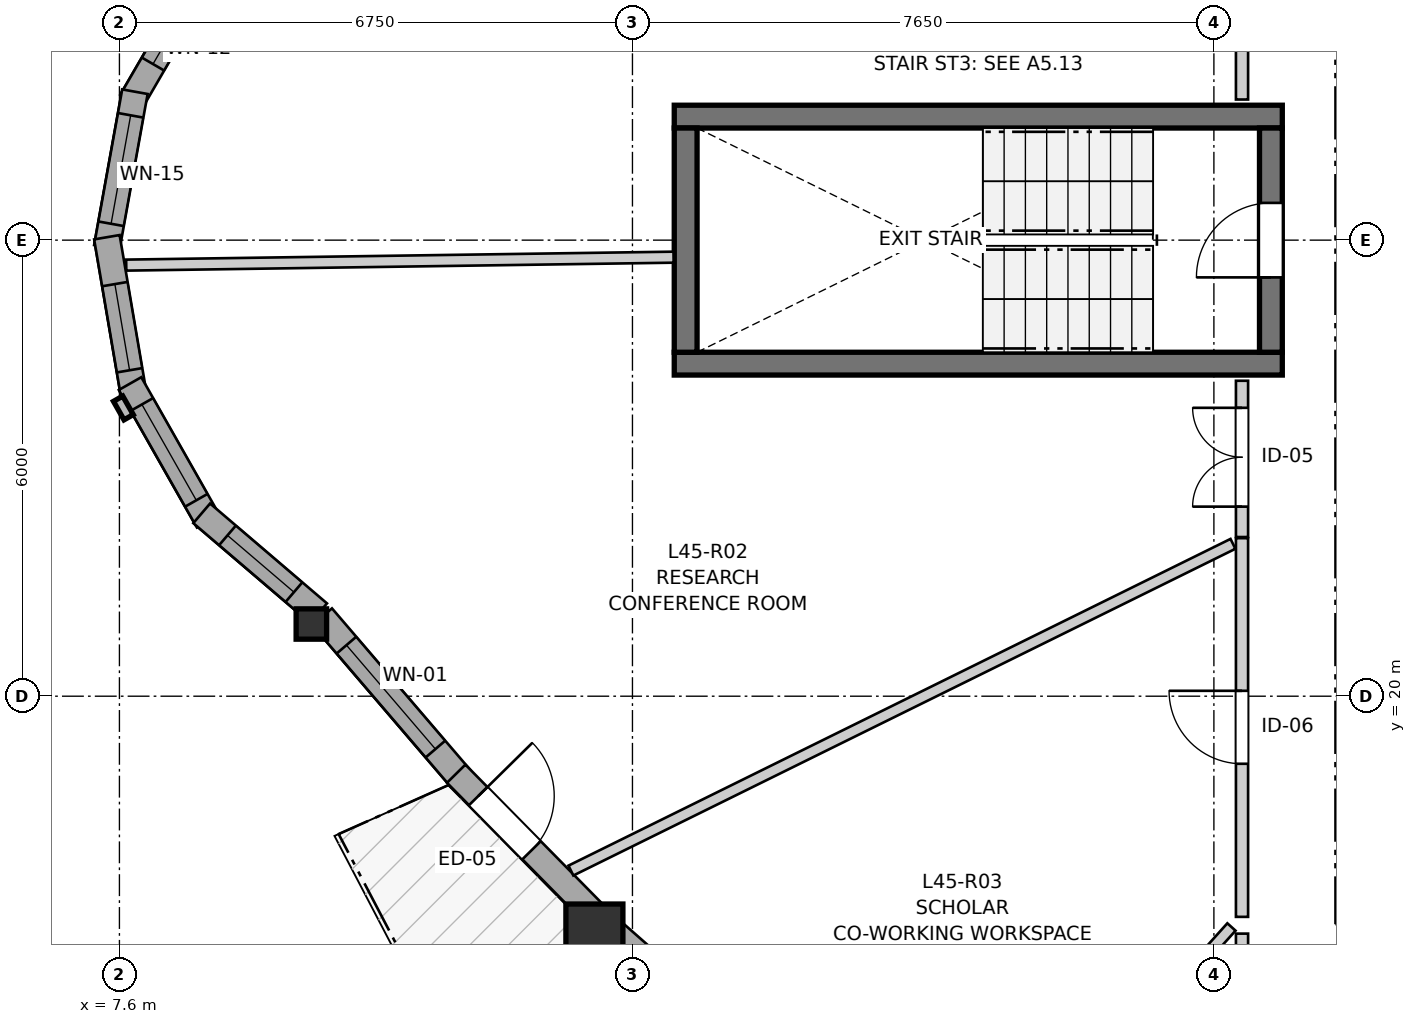
"""IFC4 building model, lengths in metres.
Left out: names, types, materials, properties, quantities, classifications, styles, units other than length and angle.
Written with IfcOpenShell. Run it as: python <this file> out.ifc"""

import sys

from ifc_helpers import new_model, si_unit, direction, frame, frame_2d, origin, origin_2d, place, context, subcontext, project, spatial, rectangle, i_section, extrude, source, transform, mapped, element, fill, save


model = new_model("IFC4")
c1 = context("Model", 3, precision=1e-05, world=origin(), true_north=direction((0.0, 1.0)))
c2 = subcontext(c1, "Body", "Model", "MODEL_VIEW")
j1 = project(units=[si_unit("LENGTHUNIT", "METRE"), si_unit("PLANEANGLEUNIT", "RADIAN")], contexts=[c1])
p1 = place(None, origin())
s1 = spatial("IfcSite", under=j1, at=p1, CompositionType="ELEMENT")
p2 = place(p1, origin())
s2 = spatial("IfcBuilding", under=s1, at=p2, CompositionType="ELEMENT")
p3 = place(p2, frame((0.0, 0.0, 152.2)))
s3 = spatial("IfcBuildingStorey", under=s2, at=p3, CompositionType="ELEMENT", Elevation=152.2)
for number, where, z_axis, x_axis in (
    (1, (14.9, 24.375, 0.0), (0.0, 0.0, 1.0), (1.0, 0.0, 0.0)),
    (2, (22.9, 27.625, 0.0), (0.0, 0.0, 1.0), (-1.0, 0.0, 0.0)),
):
    element("IfcWall", number, at=place(p3, frame(where, z_axis=z_axis, x_axis=x_axis)), inside=s3, PredefinedType="SHEAR", context=c2, shape_type="SweptSolid", body=[
        extrude(rectangle(XDim=8.0, YDim=0.3, at=frame_2d((4.0, 0.0))), origin(), (0.0, 0.0, 1.0), 2.935),
    ])
p4 = place(p3, frame((15.05, 27.475, 0.0), z_axis=(0.0, 0.0, 1.0), x_axis=(0.0, -1.0, 0.0)))
e3 = element("IfcWall", 3, at=p4, inside=s3, PredefinedType="SHEAR", context=c2, shape_type="SweptSolid", body=[
    extrude(rectangle(XDim=2.95, YDim=0.3, at=frame_2d((1.475, 0.0))), origin(), (0.0, 0.0, 1.0), 2.935),
])
p5 = place(p3, frame((22.75, 24.525, 0.0), z_axis=(0.0, 0.0, 1.0), x_axis=(0.0, 1.0, 0.0)))
e4 = element("IfcWall", 4, at=p5, inside=s3, PredefinedType="SHEAR", context=c2, shape_type="SweptSolid", body=[
    extrude(rectangle(XDim=2.95, YDim=0.3, at=frame_2d((1.475, 0.0))), origin(), (0.0, 0.0, 1.0), 2.935),
])
p6 = place(p5, frame((0.985, 0.0, 0.0)))
e5 = element("IfcOpeningElement", 5, at=p6, cuts=e4, PredefinedType="OPENING", context=c2, shape_type="SweptSolid", body=[
    extrude(rectangle(XDim=0.98, YDim=2.15, at=frame_2d((0.49, 1.075))), frame((0.0, 0.16, 0.0), z_axis=(0.0, -1.0, 0.0), x_axis=(1.0, 0.0, 0.0)), (0.0, 0.0, 1.0), 0.32),
])
m1 = source(origin(), c2, "Body", "SweptSolid", [
    extrude(i_section(OverallWidth=0.401, OverallDepth=0.399, WebThickness=0.023, FlangeThickness=0.036, FilletRadius=0.015, at=origin_2d()), origin(), (0.0, 0.0, 1.0), 2.935),
])
p7 = place(p3, frame((10.125, 20.95, 0.0), z_axis=(0.0, 0.0, 1.0), x_axis=(1.0, 0.0, 0.0)))
e6 = element("IfcColumn", 6, at=p7, inside=s3, PredefinedType="PILASTER", context=c2, shape_type="MappedRepresentation", body=[
    mapped(m1, transform((0.0, 0.0, 0.0), x_axis=(1.0, 0.0, 0.0), y_axis=(0.0, 1.0, 0.0), z_axis=(0.0, 0.0, 1.0), scale=1.0)),
])
m2 = source(origin(), c2, "Body", "SweptSolid", [
    extrude(rectangle(XDim=0.75, YDim=0.75, at=origin_2d()), origin(), (0.0, 0.0, 1.0), 2.935),
])
p8 = place(p3, frame((13.849, 16.891, 0.0), z_axis=(0.0, 0.0, 1.0), x_axis=(1.0, 0.0, 0.0)))
e7 = element("IfcColumn", 7, at=p8, inside=s3, PredefinedType="COLUMN", context=c2, shape_type="MappedRepresentation", body=[
    mapped(m2, transform((0.0, 0.0, 0.0), x_axis=(1.0, 0.0, 0.0), y_axis=(0.0, 1.0, 0.0), z_axis=(0.0, 0.0, 1.0), scale=1.0)),
])
p9 = place(p3, frame((8.803, 29.627, 0.0), z_axis=(0.0, 0.0, 1.0), x_axis=(-0.502090235641, -0.864815237651, 0.0)))
e8 = element("IfcWall", 8, at=p9, inside=s3, PredefinedType="SOLIDWALL", context=c2, shape_type="SweptSolid", body=[
    extrude(rectangle(XDim=2.081, YDim=0.34, at=frame_2d((1.041, 0.0))), origin(), (0.0, 0.0, 1.0), 2.515),
])
p10 = place(p9, frame((0.565, 0.0, 0.82)))
e9 = element("IfcOpeningElement", 9, at=p10, cuts=e8, PredefinedType="OPENING", context=c2, shape_type="SweptSolid", body=[
    extrude(rectangle(XDim=0.95, YDim=1.35, at=frame_2d((0.475, 0.675))), frame((0.0, 0.18, 0.0), z_axis=(0.0, -1.0, 0.0), x_axis=(1.0, 0.0, 0.0)), (0.0, 0.0, 1.0), 0.36),
])
p11 = place(p3, frame((7.804, 27.953, 0.0), z_axis=(0.0, 0.0, 1.0), x_axis=(-0.177605215389, -0.984101817632, 0.0)))
e10 = element("IfcWall", 10, at=p11, inside=s3, PredefinedType="SOLIDWALL", context=c2, shape_type="SweptSolid", body=[
    extrude(rectangle(XDim=2.081, YDim=0.34, at=frame_2d((1.041, 0.0))), origin(), (0.0, 0.0, 1.0), 2.515),
])
p12 = place(p11, frame((0.316, 0.0, 0.82)))
e11 = element("IfcOpeningElement", 11, at=p12, cuts=e10, PredefinedType="OPENING", context=c2, shape_type="SweptSolid", body=[
    extrude(rectangle(XDim=1.45, YDim=1.25, at=frame_2d((0.725, 0.625))), frame((0.0, 0.18, 0.0), z_axis=(0.0, -1.0, 0.0), x_axis=(1.0, 0.0, 0.0)), (0.0, 0.0, 1.0), 0.36),
])
p13 = place(p3, frame((7.435, 26.038, 0.0), z_axis=(0.0, 0.0, 1.0), x_axis=(0.168107405166, -0.985768685001, 0.0)))
e12 = element("IfcWall", 12, at=p13, inside=s3, PredefinedType="SOLIDWALL", context=c2, shape_type="SweptSolid", body=[
    extrude(rectangle(XDim=2.081, YDim=0.34, at=frame_2d((1.041, 0.0))), origin(), (0.0, 0.0, 1.0), 2.515),
])
p14 = place(p13, frame((0.625, 0.0, 0.82)))
e13 = element("IfcOpeningElement", 13, at=p14, cuts=e12, PredefinedType="OPENING", context=c2, shape_type="SweptSolid", body=[
    extrude(rectangle(XDim=1.15, YDim=1.2, at=frame_2d((0.575, 0.6))), frame((0.0, 0.18, 0.0), z_axis=(0.0, -1.0, 0.0), x_axis=(1.0, 0.0, 0.0)), (0.0, 0.0, 1.0), 0.36),
])
p15 = place(p3, frame((7.74, 24.113, 0.0), z_axis=(0.0, 0.0, 1.0), x_axis=(0.493660675866, -0.869654607936, 0.0)))
e14 = element("IfcWall", 14, at=p15, inside=s3, PredefinedType="SOLIDWALL", context=c2, shape_type="SweptSolid", body=[
    extrude(rectangle(XDim=2.081, YDim=0.34, at=frame_2d((1.041, 0.0))), origin(), (0.0, 0.0, 1.0), 2.515),
])
p16 = place(p15, frame((0.316, 0.0, 0.82)))
e15 = element("IfcOpeningElement", 15, at=p16, cuts=e14, PredefinedType="OPENING", context=c2, shape_type="SweptSolid", body=[
    extrude(rectangle(XDim=1.45, YDim=1.25, at=frame_2d((0.725, 0.625))), frame((0.0, 0.18, 0.0), z_axis=(0.0, -1.0, 0.0), x_axis=(1.0, 0.0, 0.0)), (0.0, 0.0, 1.0), 0.36),
])
p17 = place(p3, frame((8.682, 22.406, 0.0), z_axis=(0.0, 0.0, 1.0), x_axis=(0.760269373804, -0.649607942728, 0.0)))
e16 = element("IfcWall", 16, at=p17, inside=s3, PredefinedType="SOLIDWALL", context=c2, shape_type="SweptSolid", body=[
    extrude(rectangle(XDim=2.023, YDim=0.34, at=frame_2d((1.012, 0.0))), origin(), (0.0, 0.0, 1.0), 2.515),
])
p18 = place(p17, frame((0.447, 0.0, 0.82)))
e17 = element("IfcOpeningElement", 17, at=p18, cuts=e16, PredefinedType="OPENING", context=c2, shape_type="SweptSolid", body=[
    extrude(rectangle(XDim=1.15, YDim=1.2, at=frame_2d((0.575, 0.6))), frame((0.0, 0.18, 0.0), z_axis=(0.0, -1.0, 0.0), x_axis=(1.0, 0.0, 0.0)), (0.0, 0.0, 1.0), 0.36),
])
p19 = place(p3, frame((10.267, 21.045, 0.0), z_axis=(0.0, 0.0, 1.0), x_axis=(0.650339388137, -0.759643785098, 0.0)))
e18 = element("IfcWall", 18, at=p19, inside=s3, PredefinedType="SOLIDWALL", context=c2, shape_type="SweptSolid", body=[
    extrude(rectangle(XDim=2.803, YDim=0.34, at=frame_2d((1.402, 0.0))), origin(), (0.0, 0.0, 1.0), 2.515),
])
p20 = place(p19, frame((0.491, 0.0, 0.82)))
e19 = element("IfcOpeningElement", 19, at=p20, cuts=e18, PredefinedType="OPENING", context=c2, shape_type="SweptSolid", body=[
    extrude(rectangle(XDim=1.8, YDim=1.45, at=frame_2d((0.9, 0.725))), frame((0.0, 0.18, 0.0), z_axis=(0.0, -1.0, 0.0), x_axis=(1.0, 0.0, 0.0)), (0.0, 0.0, 1.0), 0.36),
])
p21 = place(p3, frame((12.031, 18.98, 0.0), z_axis=(0.0, 0.0, 1.0), x_axis=(0.701518749222, -0.712650997677, 0.0)))
e20 = element("IfcWall", 20, at=p21, inside=s3, PredefinedType="SOLIDWALL", context=c2, shape_type="SweptSolid", body=[
    extrude(rectangle(XDim=2.61, YDim=0.34, at=frame_2d((1.305, 0.0))), origin(), (0.0, 0.0, 1.0), 2.515),
])
p22 = place(p21, frame((0.413, 0.0, 0.0)))
e21 = element("IfcOpeningElement", 21, at=p22, cuts=e20, PredefinedType="OPENING", context=c2, shape_type="SweptSolid", body=[
    extrude(rectangle(XDim=1.0, YDim=2.1, at=frame_2d((0.5, 1.05))), frame((0.0, 0.18, 0.0), z_axis=(0.0, -1.0, 0.0), x_axis=(1.0, 0.0, 0.0)), (0.0, 0.0, 1.0), 0.36),
])
p23 = place(p3, frame((14.078, 16.916, 0.0), z_axis=(0.0, 0.0, 1.0), x_axis=(0.751177768463, -0.660099962253, 0.0)))
e22 = element("IfcWall", 22, at=p23, inside=s3, PredefinedType="SOLIDWALL", context=c2, shape_type="SweptSolid", body=[
    extrude(rectangle(XDim=2.565, YDim=0.34, at=frame_2d((1.283, 0.0))), origin(), (0.0, 0.0, 1.0), 2.515),
])
p24 = place(p23, frame((0.528, 0.0, 0.82)))
e23 = element("IfcOpeningElement", 23, at=p24, cuts=e22, PredefinedType="OPENING", context=c2, shape_type="SweptSolid", body=[
    extrude(rectangle(XDim=1.5, YDim=1.45, at=frame_2d((0.75, 0.725))), frame((0.0, 0.18, 0.0), z_axis=(0.0, -1.0, 0.0), x_axis=(1.0, 0.0, 0.0)), (0.0, 0.0, 1.0), 0.36),
])
p25 = place(p3, frame((22.37, 27.85, 0.0), z_axis=(0.0, 0.0, 1.0), x_axis=(0.0, 1.0, 0.0)))
e24 = element("IfcWall", 24, at=p25, inside=s3, PredefinedType="PARTITIONING", context=c2, shape_type="SweptSolid", body=[
    extrude(rectangle(XDim=5.294, YDim=0.16, at=frame_2d((2.647, 0.0))), origin(), (0.0, 0.0, 1.0), 2.935),
])
p26 = place(p25, frame((2.341, 0.0, 0.0)))
e25 = element("IfcOpeningElement", 25, at=p26, cuts=e24, PredefinedType="OPENING", context=c2, shape_type="SweptSolid", body=[
    extrude(rectangle(XDim=1.3, YDim=2.1, at=frame_2d((0.65, 1.05))), frame((0.0, 0.09, 0.0), z_axis=(0.0, -1.0, 0.0), x_axis=(1.0, 0.0, 0.0)), (0.0, 0.0, 1.0), 0.18),
])
p27 = place(p3, frame((22.37, 17.097, 0.0), z_axis=(0.0, 0.0, 1.0), x_axis=(0.0, 1.0, 0.0)))
e26 = element("IfcWall", 26, at=p27, inside=s3, PredefinedType="PARTITIONING", context=c2, shape_type="SweptSolid", body=[
    extrude(rectangle(XDim=4.982, YDim=0.16, at=frame_2d((2.491, 0.0))), origin(), (0.0, 0.0, 1.0), 2.935),
])
p28 = place(p27, frame((2.014, 0.0, 0.0)))
e27 = element("IfcOpeningElement", 27, at=p28, cuts=e26, PredefinedType="OPENING", context=c2, shape_type="SweptSolid", body=[
    extrude(rectangle(XDim=0.96, YDim=2.1, at=frame_2d((0.48, 1.05))), frame((0.0, 0.09, 0.0), z_axis=(0.0, -1.0, 0.0), x_axis=(1.0, 0.0, 0.0)), (0.0, 0.0, 1.0), 0.18),
])
p29 = place(p3, frame((22.37, 22.094, 0.0), z_axis=(0.0, 0.0, 1.0), x_axis=(0.0, 1.0, 0.0)))
e28 = element("IfcWall", 28, at=p29, inside=s3, PredefinedType="PARTITIONING", context=c2, shape_type="SweptSolid", body=[
    extrude(rectangle(XDim=2.056, YDim=0.16, at=frame_2d((1.028, 0.0))), origin(), (0.0, 0.0, 1.0), 2.935),
])
p30 = place(p29, frame((0.4, 0.0, 0.0)))
e29 = element("IfcOpeningElement", 29, at=p30, cuts=e28, PredefinedType="OPENING", context=c2, shape_type="SweptSolid", body=[
    extrude(rectangle(XDim=1.3, YDim=2.1, at=frame_2d((0.65, 1.05))), frame((0.0, 0.09, 0.0), z_axis=(0.0, -1.0, 0.0), x_axis=(1.0, 0.0, 0.0)), (0.0, 0.0, 1.0), 0.18),
])
p31 = place(p3, frame((13.54, 17.706, 0.0), z_axis=(0.0, 0.0, 1.0), x_axis=(0.896762400541, 0.442512369291, 0.0)))
e30 = element("IfcWall", 30, at=p31, inside=s3, PredefinedType="PARTITIONING", context=c2, shape_type="SweptSolid", body=[
    extrude(rectangle(XDim=9.713, YDim=0.145, at=frame_2d((4.857, 0.0))), origin(), (0.0, 0.0, 1.0), 2.935),
])
p32 = place(p3, frame((7.689, 25.671, 0.0), z_axis=(0.0, 0.0, 1.0), x_axis=(0.999894747293, 0.014508422953, 0.0)))
e31 = element("IfcWall", 31, at=p32, inside=s3, PredefinedType="PARTITIONING", context=c2, shape_type="SweptSolid", body=[
    extrude(rectangle(XDim=7.202, YDim=0.145, at=frame_2d((3.601, 0.0))), origin(), (0.0, 0.0, 1.0), 2.935),
])
p33 = place(p3, frame((18.957, 13.322, 0.0), z_axis=(0.0, 0.0, 1.0), x_axis=(0.66841369867, 0.743789706456, 0.0)))
e32 = element("IfcWall", 32, at=p33, inside=s3, PredefinedType="PARTITIONING", context=c2, shape_type="SweptSolid", body=[
    extrude(rectangle(XDim=4.897, YDim=0.145, at=frame_2d((2.449, 0.0))), origin(), (0.0, 0.0, 1.0), 2.935),
])
p34 = place(p3, frame((22.37, 14.538, 0.0), z_axis=(0.0, 0.0, 1.0), x_axis=(0.0, 1.0, 0.0)))
e33 = element("IfcWall", 33, at=p34, inside=s3, PredefinedType="PARTITIONING", context=c2, shape_type="SweptSolid", body=[
    extrude(rectangle(XDim=2.338, YDim=0.16, at=frame_2d((1.169, 0.0))), origin(), (0.0, 0.0, 1.0), 2.935),
])
m3 = source(origin(), c2, "Body", "SweptSolid", [
    extrude(rectangle(XDim=0.95, YDim=1.35, at=frame_2d((0.475, 0.675))), frame((0.0, 0.03, 0.0), z_axis=(0.0, -1.0, 0.0), x_axis=(1.0, 0.0, 0.0)), (0.0, 0.0, 1.0), 0.06),
])
p35 = place(p10, origin())
e34 = element("IfcWindow", 34, at=p35, inside=s3, PartitioningType="SINGLE_PANEL", PredefinedType="WINDOW", context=c2, shape_type="MappedRepresentation", body=[
    mapped(m3, transform((0.0, 0.0, 0.0), x_axis=(1.0, 0.0, 0.0), y_axis=(0.0, 1.0, 0.0), z_axis=(0.0, 0.0, 1.0), scale=1.0)),
])
fill(e9, e34)
m4 = source(origin(), c2, "Body", "SweptSolid", [
    extrude(rectangle(XDim=1.45, YDim=1.25, at=frame_2d((0.725, 0.625))), frame((0.0, 0.03, 0.0), z_axis=(0.0, -1.0, 0.0), x_axis=(1.0, 0.0, 0.0)), (0.0, 0.0, 1.0), 0.06),
])
p36 = place(p12, origin())
e35 = element("IfcWindow", 35, at=p36, inside=s3, PartitioningType="SINGLE_PANEL", PredefinedType="WINDOW", context=c2, shape_type="MappedRepresentation", body=[
    mapped(m4, transform((0.0, 0.0, 0.0), x_axis=(1.0, 0.0, 0.0), y_axis=(0.0, 1.0, 0.0), z_axis=(0.0, 0.0, 1.0), scale=1.0)),
])
fill(e11, e35)
m5 = source(origin(), c2, "Body", "SweptSolid", [
    extrude(rectangle(XDim=1.15, YDim=1.2, at=frame_2d((0.575, 0.6))), frame((0.0, 0.03, 0.0), z_axis=(0.0, -1.0, 0.0), x_axis=(1.0, 0.0, 0.0)), (0.0, 0.0, 1.0), 0.06),
])
p37 = place(p14, origin())
e36 = element("IfcWindow", 36, at=p37, inside=s3, PartitioningType="SINGLE_PANEL", PredefinedType="WINDOW", context=c2, shape_type="MappedRepresentation", body=[
    mapped(m5, transform((0.0, 0.0, 0.0), x_axis=(1.0, 0.0, 0.0), y_axis=(0.0, 1.0, 0.0), z_axis=(0.0, 0.0, 1.0), scale=1.0)),
])
fill(e13, e36)
p38 = place(p16, origin())
e37 = element("IfcWindow", 37, at=p38, inside=s3, PartitioningType="SINGLE_PANEL", PredefinedType="WINDOW", context=c2, shape_type="MappedRepresentation", body=[
    mapped(m4, transform((0.0, 0.0, 0.0), x_axis=(1.0, 0.0, 0.0), y_axis=(0.0, 1.0, 0.0), z_axis=(0.0, 0.0, 1.0), scale=1.0)),
])
fill(e15, e37)
p39 = place(p18, origin())
e38 = element("IfcWindow", 38, at=p39, inside=s3, PartitioningType="SINGLE_PANEL", PredefinedType="WINDOW", context=c2, shape_type="MappedRepresentation", body=[
    mapped(m5, transform((0.0, 0.0, 0.0), x_axis=(1.0, 0.0, 0.0), y_axis=(0.0, 1.0, 0.0), z_axis=(0.0, 0.0, 1.0), scale=1.0)),
])
fill(e17, e38)
m6 = source(origin(), c2, "Body", "SweptSolid", [
    extrude(rectangle(XDim=1.8, YDim=1.45, at=frame_2d((0.9, 0.725))), frame((0.0, 0.03, 0.0), z_axis=(0.0, -1.0, 0.0), x_axis=(1.0, 0.0, 0.0)), (0.0, 0.0, 1.0), 0.06),
])
p40 = place(p20, origin())
e39 = element("IfcWindow", 39, at=p40, inside=s3, PartitioningType="SINGLE_PANEL", PredefinedType="WINDOW", context=c2, shape_type="MappedRepresentation", body=[
    mapped(m6, transform((0.0, 0.0, 0.0), x_axis=(1.0, 0.0, 0.0), y_axis=(0.0, 1.0, 0.0), z_axis=(0.0, 0.0, 1.0), scale=1.0)),
])
fill(e19, e39)
m7 = source(origin(), c2, "Body", "SweptSolid", [
    extrude(rectangle(XDim=1.0, YDim=2.1, at=frame_2d((0.5, 1.05))), frame((0.0, 0.025, 0.0), z_axis=(0.0, -1.0, 0.0), x_axis=(1.0, 0.0, 0.0)), (0.0, 0.0, 1.0), 0.05),
])
p41 = place(p22, origin())
e40 = element("IfcDoor", 40, at=p41, inside=s3, OperationType="SINGLE_SWING_LEFT", PredefinedType="DOOR", context=c2, shape_type="MappedRepresentation", body=[
    mapped(m7, transform((0.0, 0.0, 0.0), x_axis=(1.0, 0.0, 0.0), y_axis=(0.0, 1.0, 0.0), z_axis=(0.0, 0.0, 1.0), scale=1.0)),
])
fill(e21, e40)
m8 = source(origin(), c2, "Body", "SweptSolid", [
    extrude(rectangle(XDim=0.98, YDim=2.15, at=frame_2d((0.49, 1.075))), frame((0.0, 0.025, 0.0), z_axis=(0.0, -1.0, 0.0), x_axis=(1.0, 0.0, 0.0)), (0.0, 0.0, 1.0), 0.05),
])
p42 = place(p6, origin())
e41 = element("IfcDoor", 41, at=p42, inside=s3, OperationType="SINGLE_SWING_LEFT", PredefinedType="DOOR", context=c2, shape_type="MappedRepresentation", body=[
    mapped(m8, transform((0.0, 0.0, 0.0), x_axis=(1.0, 0.0, 0.0), y_axis=(0.0, 1.0, 0.0), z_axis=(0.0, 0.0, 1.0), scale=1.0)),
])
fill(e5, e41)
m9 = source(origin(), c2, "Body", "SweptSolid", [
    extrude(rectangle(XDim=0.96, YDim=2.1, at=frame_2d((0.48, 1.05))), frame((0.0, 0.025, 0.0), z_axis=(0.0, -1.0, 0.0), x_axis=(1.0, 0.0, 0.0)), (0.0, 0.0, 1.0), 0.05),
])
p43 = place(p28, origin())
e42 = element("IfcDoor", 42, at=p43, inside=s3, OperationType="SINGLE_SWING_RIGHT", PredefinedType="DOOR", context=c2, shape_type="MappedRepresentation", body=[
    mapped(m9, transform((0.0, 0.0, 0.0), x_axis=(1.0, 0.0, 0.0), y_axis=(0.0, 1.0, 0.0), z_axis=(0.0, 0.0, 1.0), scale=1.0)),
])
fill(e27, e42)
m10 = source(origin(), c2, "Body", "SweptSolid", [
    extrude(rectangle(XDim=1.3, YDim=2.1, at=frame_2d((0.65, 1.05))), frame((0.0, 0.025, 0.0), z_axis=(0.0, -1.0, 0.0), x_axis=(1.0, 0.0, 0.0)), (0.0, 0.0, 1.0), 0.05),
])
p44 = place(p30, origin())
e43 = element("IfcDoor", 43, at=p44, inside=s3, OperationType="DOUBLE_DOOR_SINGLE_SWING", PredefinedType="DOOR", context=c2, shape_type="MappedRepresentation", body=[
    mapped(m10, transform((0.0, 0.0, 0.0), x_axis=(1.0, 0.0, 0.0), y_axis=(0.0, 1.0, 0.0), z_axis=(0.0, 0.0, 1.0), scale=1.0)),
])
fill(e29, e43)
save(model, sys.argv[1])
